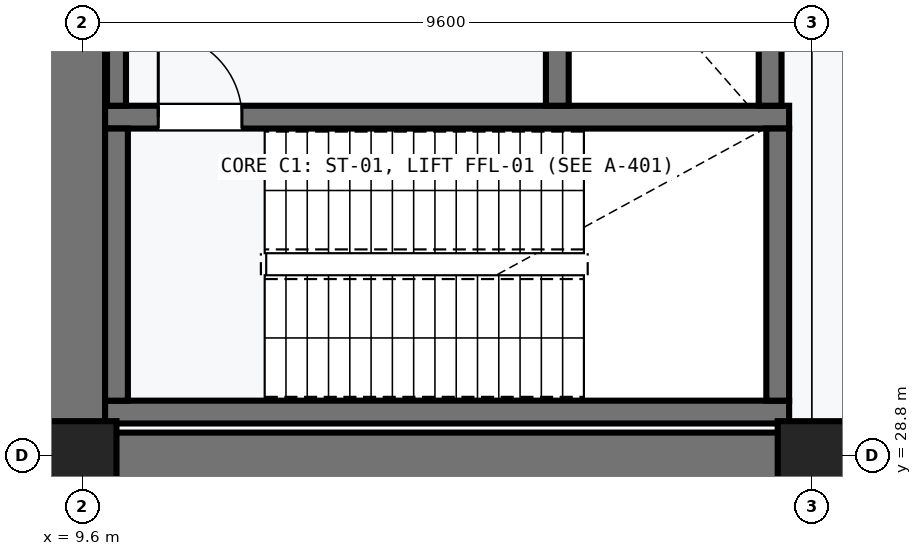
"""IFC4 building model, lengths in metres.
Left out: names, types, materials, properties, quantities, classifications, styles, units other than length and angle.
Written with IfcOpenShell. Run it as: python <this file> out.ifc"""

import sys

from ifc_helpers import new_model, si_unit, direction, frame, frame_2d, origin, origin_2d, place, context, subcontext, project, spatial, rectangle, extrude, element, fill, save


model = new_model("IFC4")
c1 = context("Model", 3, precision=1e-05, world=origin(), true_north=direction((0.0, 1.0)))
c2 = subcontext(c1, "Body", "Model", "MODEL_VIEW")
j1 = project(units=[si_unit("LENGTHUNIT", "METRE"), si_unit("PLANEANGLEUNIT", "RADIAN")], contexts=[c1])
p1 = place(None, origin())
s1 = spatial("IfcSite", under=j1, at=p1, CompositionType="ELEMENT")
p2 = place(p1, origin())
s2 = spatial("IfcBuilding", under=s1, at=p2, CompositionType="ELEMENT")
p3 = place(p2, frame((0.0, 0.0, -5.4)))
s3 = spatial("IfcBuildingStorey", under=s2, at=p3, CompositionType="ELEMENT", Elevation=-5.4)
p4 = place(p3, frame((28.9, 28.7, 0.0), z_axis=(0.0, 0.0, 1.0), x_axis=(-1.0, 0.0, 0.0)))
e1 = element("IfcWall", 1, at=p4, inside=s3, PredefinedType="SOLIDWALL", context=c2, shape_type="SweptSolid", body=[
    extrude(rectangle(XDim=19.4, YDim=0.8, at=frame_2d((9.7, 0.0))), origin(), (0.0, 0.0, 1.0), 5.0),
])
p5 = place(p3, frame((9.5, 28.7, 0.0), z_axis=(0.0, 0.0, 1.0), x_axis=(0.0, 1.0, 0.0)))
e2 = element("IfcWall", 2, at=p5, inside=s3, PredefinedType="SOLIDWALL", context=c2, shape_type="SweptSolid", body=[
    extrude(rectangle(XDim=19.4, YDim=0.8, at=frame_2d((9.7, 0.0))), origin(), (0.0, 0.0, 1.0), 5.0),
])
for number, where, z_axis, x_axis in (
    (3, (9.6, 28.8, 0.0), (0.0, 0.0, 1.0), (1.0, 0.0, 0.0)),
    (4, (19.2, 28.8, 0.0), (0.0, 0.0, 1.0), (1.0, 0.0, 0.0)),
):
    element("IfcColumn", number, at=place(p3, frame(where, z_axis=z_axis, x_axis=x_axis)), inside=s3, PredefinedType="COLUMN", context=c2, shape_type="SweptSolid", body=[
        extrude(rectangle(XDim=0.9, YDim=0.9, at=origin_2d()), origin(), (0.0, 0.0, 1.0), 5.0),
    ])
p6 = place(p3, frame((9.9, 29.37, 0.0), z_axis=(0.0, 0.0, 1.0), x_axis=(1.0, 0.0, 0.0)))
e5 = element("IfcWall", 5, at=p6, inside=s3, PredefinedType="SHEAR", context=c2, shape_type="SweptSolid", body=[
    extrude(rectangle(XDim=9.0, YDim=0.3, at=frame_2d((4.5, 0.0))), origin(), (0.0, 0.0, 1.0), 5.0),
])
p7 = place(p3, frame((18.9, 33.25, 0.0), z_axis=(0.0, 0.0, 1.0), x_axis=(-1.0, 0.0, 0.0)))
e6 = element("IfcWall", 6, at=p7, inside=s3, PredefinedType="SHEAR", context=c2, shape_type="SweptSolid", body=[
    extrude(rectangle(XDim=9.0, YDim=0.3, at=frame_2d((4.5, 0.0))), origin(), (0.0, 0.0, 1.0), 5.0),
])
p8 = place(p7, frame((7.2, 0.0, 0.0)))
e7 = element("IfcOpeningElement", 7, at=p8, cuts=e6, PredefinedType="OPENING", context=c2, shape_type="SweptSolid", body=[
    extrude(rectangle(XDim=1.1, YDim=2.15, at=frame_2d((0.55, 1.075))), frame((0.0, 0.16, 0.0), z_axis=(0.0, -1.0, 0.0), x_axis=(1.0, 0.0, 0.0)), (0.0, 0.0, 1.0), 0.32),
])
for number, where, z_axis, x_axis in (
    (8, (10.05, 29.52, 0.0), (0.0, 0.0, 1.0), (0.0, 1.0, 0.0)),
    (9, (18.75, 33.1, 0.0), (0.0, 0.0, 1.0), (0.0, -1.0, 0.0)),
):
    element("IfcWall", number, at=place(p3, frame(where, z_axis=z_axis, x_axis=x_axis)), inside=s3, PredefinedType="SHEAR", context=c2, shape_type="SweptSolid", body=[
        extrude(rectangle(XDim=3.58, YDim=0.3, at=frame_2d((1.79, 0.0))), origin(), (0.0, 0.0, 1.0), 5.0),
    ])
p9 = place(p3, frame((15.85, 36.1, 0.0), z_axis=(0.0, 0.0, 1.0), x_axis=(0.0, -1.0, 0.0)))
e10 = element("IfcWall", 10, at=p9, inside=s3, PredefinedType="SHEAR", context=c2, shape_type="SweptSolid", body=[
    extrude(rectangle(XDim=2.7, YDim=0.3, at=frame_2d((1.35, 0.0))), origin(), (0.0, 0.0, 1.0), 5.0),
])
p10 = place(p9, frame((0.8, 0.0, 0.0)))
e11 = element("IfcOpeningElement", 11, at=p10, cuts=e10, PredefinedType="OPENING", context=c2, shape_type="SweptSolid", body=[
    extrude(rectangle(XDim=1.1, YDim=2.1, at=frame_2d((0.55, 1.05))), frame((0.0, 0.16, 0.0), z_axis=(0.0, -1.0, 0.0), x_axis=(1.0, 0.0, 0.0)), (0.0, 0.0, 1.0), 0.32),
])
p11 = place(p3, frame((18.65, 33.4, 0.0), z_axis=(0.0, 0.0, 1.0), x_axis=(0.0, 1.0, 0.0)))
e12 = element("IfcWall", 12, at=p11, inside=s3, PredefinedType="SHEAR", context=c2, shape_type="SweptSolid", body=[
    extrude(rectangle(XDim=2.7, YDim=0.3, at=frame_2d((1.35, 0.0))), origin(), (0.0, 0.0, 1.0), 5.0),
])
p12 = place(p3, frame((10.05, 33.4, 0.0), z_axis=(0.0, 0.0, 1.0), x_axis=(0.0, 1.0, 0.0)))
e13 = element("IfcWall", 13, at=p12, inside=s3, PredefinedType="SHEAR", context=c2, shape_type="SweptSolid", body=[
    extrude(rectangle(XDim=2.7, YDim=0.25, at=frame_2d((1.35, 0.0))), origin(), (0.0, 0.0, 1.0), 5.0),
])
p13 = place(p8, frame((1.1, 0.0, 0.0), z_axis=(0.0, 0.0, 1.0), x_axis=(-1.0, 0.0, 0.0)))
e14 = element("IfcDoor", 14, at=p13, inside=s3, OperationType="SINGLE_SWING_RIGHT", PredefinedType="DOOR", context=c2, shape_type="SweptSolid", body=[
    extrude(rectangle(XDim=1.1, YDim=2.15, at=frame_2d((0.55, 1.075))), frame((0.0, 0.025, 0.0), z_axis=(0.0, -1.0, 0.0), x_axis=(1.0, 0.0, 0.0)), (0.0, 0.0, 1.0), 0.05),
])
fill(e7, e14)
save(model, sys.argv[1])
